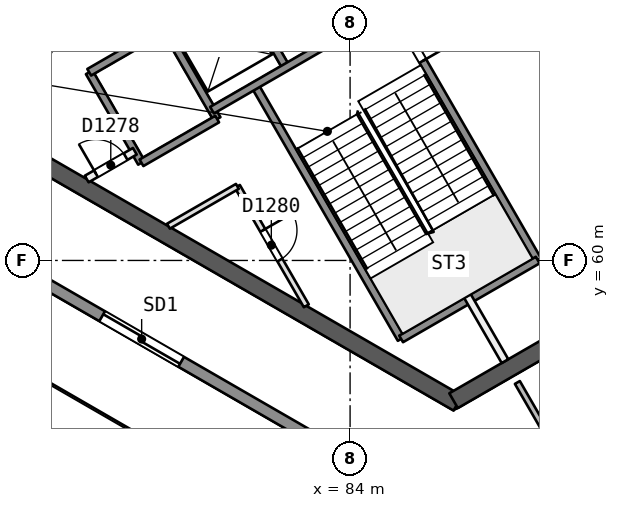
"""IFC4 building model, lengths in metres.
Left out: names, types, materials, properties, quantities, classifications, styles, units other than length and angle.
Written with IfcOpenShell. Run it as: python <this file> out.ifc"""

import sys

from ifc_helpers import new_model, si_unit, direction, frame, frame_2d, origin, place, context, subcontext, project, spatial, rectangle, extrude, element, fill, save


model = new_model("IFC4")
c1 = context("Model", 3, precision=1e-05, world=origin(), true_north=direction((0.0, 1.0)))
c2 = subcontext(c1, "Body", "Model", "MODEL_VIEW")
j1 = project(units=[si_unit("LENGTHUNIT", "METRE"), si_unit("PLANEANGLEUNIT", "RADIAN")], contexts=[c1])
p1 = place(None, origin())
s1 = spatial("IfcSite", under=j1, at=p1, CompositionType="ELEMENT")
p2 = place(p1, origin())
s2 = spatial("IfcBuilding", under=s1, at=p2, CompositionType="ELEMENT")
p3 = place(p2, frame((0.0, 0.0, 235.4)))
s3 = spatial("IfcBuildingStorey", under=s2, at=p3, CompositionType="ELEMENT", Elevation=235.4)
p4 = place(p3, frame((79.63, 71.981, 0.0), z_axis=(0.0, 0.0, 1.0), x_axis=(-0.500002171595, -0.86602415001, 0.0)))
e1 = element("IfcWall", 1, at=p4, inside=s3, PredefinedType="SHEAR", context=c2, shape_type="SweptSolid", body=[
    extrude(rectangle(XDim=10.25, YDim=0.45, at=frame_2d((5.125, 0.0))), origin(), (0.0, 0.0, 1.0), 3.7),
])
p5 = place(p4, frame((0.82, 0.0, 0.0)))
e2 = element("IfcOpeningElement", 2, at=p5, cuts=e1, PredefinedType="OPENING", context=c2, shape_type="SweptSolid", body=[
    extrude(rectangle(XDim=1.2, YDim=2.1, at=frame_2d((0.6, 1.05))), frame((0.0, 0.235, 0.0), z_axis=(0.0, -1.0, 0.0), x_axis=(1.0, 0.0, 0.0)), (0.0, 0.0, 1.0), 0.471),
])
p6 = place(p3, frame((74.617, 63.299, 0.0), z_axis=(0.0, 0.0, 1.0), x_axis=(0.86602594008, -0.499999071108, 0.0)))
e3 = element("IfcWall", 3, at=p6, inside=s3, PredefinedType="SHEAR", context=c2, shape_type="SweptSolid", body=[
    extrude(rectangle(XDim=14.108, YDim=0.45, at=frame_2d((7.054, 0.0))), origin(), (0.0, 0.0, 1.0), 3.7),
])
p7 = place(p3, frame((86.723, 56.31, 0.0), z_axis=(0.0, 0.0, 1.0), x_axis=(0.866042179588, 0.49997094233, 0.0)))
e4 = element("IfcWall", 4, at=p7, inside=s3, PredefinedType="SHEAR", context=c2, shape_type="SweptSolid", body=[
    extrude(rectangle(XDim=3.515, YDim=0.45, at=frame_2d((1.758, 0.0))), origin(), (0.0, 0.0, 1.0), 3.7),
])
p8 = place(p3, frame((88.402, 56.789, 0.0), z_axis=(0.0, 0.0, 1.0), x_axis=(0.500005547131, -0.866022201123, 0.0)))
e5 = element("IfcWall", 5, at=p8, inside=s3, PredefinedType="PARTITIONING", context=c2, shape_type="SweptSolid", body=[
    extrude(rectangle(XDim=3.334, YDim=0.15, at=frame_2d((1.667, 0.0))), origin(), (0.0, 0.0, 1.0), 3.3),
])
p9 = place(p3, frame((87.932, 52.496, 0.0), z_axis=(0.0, 0.0, 1.0), x_axis=(-0.866025334516, 0.500000119977, 0.0)))
e6 = element("IfcWall", 6, at=p9, inside=s3, PredefinedType="SOLIDWALL", context=c2, shape_type="SweptSolid", body=[
    extrude(rectangle(XDim=49.903, YDim=0.3, at=frame_2d((24.952, 0.0))), origin(), (0.0, 0.0, 1.0), 3.3),
])
p10 = place(p9, frame((23.907, 0.0, 0.0)))
e7 = element("IfcOpeningElement", 7, at=p10, cuts=e6, PredefinedType="OPENING", context=c2, shape_type="SweptSolid", body=[
    extrude(rectangle(XDim=2.4, YDim=2.4, at=frame_2d((1.2, 1.2))), frame((0.0, 0.161, 0.0), z_axis=(0.0, -1.0, 0.0), x_axis=(1.0, 0.0, 0.0)), (0.0, 0.0, 1.0), 0.321),
])
p11 = place(p9, frame((37.985, 0.0, 0.0)))
e8 = element("IfcOpeningElement", 8, at=p11, cuts=e6, PredefinedType="OPENING", context=c2, shape_type="SweptSolid", body=[
    extrude(rectangle(XDim=2.4, YDim=2.4, at=frame_2d((1.2, 1.2))), frame((0.0, 0.161, 0.0), z_axis=(0.0, -1.0, 0.0), x_axis=(1.0, 0.0, 0.0)), (0.0, 0.0, 1.0), 0.321),
])
p12 = place(p9, frame((9.674, 0.0, 0.0)))
e9 = element("IfcOpeningElement", 9, at=p12, cuts=e6, PredefinedType="OPENING", context=c2, shape_type="SweptSolid", body=[
    extrude(rectangle(XDim=2.4, YDim=2.4, at=frame_2d((1.2, 1.2))), frame((0.0, 0.161, 0.0), z_axis=(0.0, -1.0, 0.0), x_axis=(1.0, 0.0, 0.0)), (0.0, 0.0, 1.0), 0.321),
])
p13 = place(p3, frame((77.135, 64.952, 0.0), z_axis=(0.0, 0.0, 1.0), x_axis=(0.499996545922, -0.866027397988, 0.0)))
e10 = element("IfcWall", 10, at=p13, inside=s3, PredefinedType="SOLIDWALL", context=c2, shape_type="SweptSolid", body=[
    extrude(rectangle(XDim=2.75, YDim=0.2, at=frame_2d((1.375, 0.0))), origin(), (0.0, 0.0, 1.0), 3.3),
])
p14 = place(p3, frame((81.034, 61.949, 0.0), z_axis=(0.0, 0.0, 1.0), x_axis=(0.499945732631, -0.866056732798, 0.0)))
e11 = element("IfcWall", 11, at=p14, inside=s3, PredefinedType="PARTITIONING", context=c2, shape_type="SweptSolid", body=[
    extrude(rectangle(XDim=3.628, YDim=0.15, at=frame_2d((1.814, 0.0))), origin(), (0.0, 0.0, 1.0), 3.3),
])
p15 = place(p14, frame((1.337, 0.0, 0.0)))
e12 = element("IfcOpeningElement", 12, at=p15, cuts=e11, PredefinedType="OPENING", context=c2, shape_type="SweptSolid", body=[
    extrude(rectangle(XDim=0.9, YDim=2.1, at=frame_2d((0.45, 1.05))), frame((0.0, 0.085, 0.0), z_axis=(0.0, -1.0, 0.0), x_axis=(1.0, 0.0, 0.0)), (0.0, 0.0, 1.0), 0.171),
])
p16 = place(p3, frame((79.127, 66.102, 0.0), z_axis=(0.0, 0.0, 1.0), x_axis=(0.499996545922, -0.866027397988, 0.0)))
e13 = element("IfcWall", 13, at=p16, inside=s3, PredefinedType="SOLIDWALL", context=c2, shape_type="SweptSolid", body=[
    extrude(rectangle(XDim=2.75, YDim=0.2, at=frame_2d((1.375, 0.0))), origin(), (0.0, 0.0, 1.0), 3.3),
])
p17 = place(p3, frame((81.493, 64.604, 0.0), z_axis=(0.0, 0.0, 1.0), x_axis=(0.500006057782, -0.866021906294, 0.0)))
e14 = element("IfcWall", 14, at=p17, inside=s3, PredefinedType="SOLIDWALL", context=c2, shape_type="SweptSolid", body=[
    extrude(rectangle(XDim=7.7, YDim=0.2, at=frame_2d((3.85, 0.0))), origin(), (0.0, 0.0, 1.0), 3.3),
])
p18 = place(p3, frame((81.076, 67.227, 0.0), z_axis=(0.0, 0.0, 1.0), x_axis=(0.50000366821, -0.866023285932, 0.0)))
e15 = element("IfcWall", 15, at=p18, inside=s3, PredefinedType="SOLIDWALL", context=c2, shape_type="SweptSolid", body=[
    extrude(rectangle(XDim=2.48, YDim=0.2, at=frame_2d((1.24, 0.0))), origin(), (0.0, 0.0, 1.0), 3.3),
])
p19 = place(p3, frame((87.09, 59.06, 0.0), z_axis=(0.0, 0.0, 1.0), x_axis=(0.500011643316, -0.866018681408, 0.0)))
e16 = element("IfcWall", 16, at=p19, inside=s3, PredefinedType="PARTITIONING", context=c2, shape_type="SweptSolid", body=[
    extrude(rectangle(XDim=1.973, YDim=0.2, at=frame_2d((0.987, 0.0))), origin(), (0.0, 0.0, 1.0), 3.3),
])
p20 = place(p3, frame((85.087, 66.679, 0.0), z_axis=(0.0, 0.0, 1.0), x_axis=(0.500019787375, -0.866013979237, 0.0)))
e17 = element("IfcWall", 17, at=p20, inside=s3, PredefinedType="SOLIDWALL", context=c2, shape_type="SweptSolid", body=[
    extrude(rectangle(XDim=7.7, YDim=0.2, at=frame_2d((3.85, 0.0))), origin(), (0.0, 0.0, 1.0), 3.3),
])
p21 = place(p20, frame((0.55, 0.0, 0.0)))
e18 = element("IfcOpeningElement", 18, at=p21, cuts=e17, PredefinedType="OPENING", context=c2, shape_type="SweptSolid", body=[
    extrude(rectangle(XDim=1.1, YDim=2.1, at=frame_2d((0.55, 1.05))), frame((0.0, 0.11, 0.0), z_axis=(0.0, -1.0, 0.0), x_axis=(1.0, 0.0, 0.0)), (0.0, 0.0, 1.0), 0.221),
])
p22 = place(p3, frame((77.135, 64.952, 0.0), z_axis=(0.0, 0.0, 1.0), x_axis=(0.866031916153, 0.499988720078, 0.0)))
e19 = element("IfcWall", 19, at=p22, inside=s3, PredefinedType="SOLIDWALL", context=c2, shape_type="SweptSolid", body=[
    extrude(rectangle(XDim=11.35, YDim=0.2, at=frame_2d((5.675, 0.0))), origin(), (0.0, 0.0, 1.0), 3.3),
])
p23 = place(p22, frame((2.875, 0.0, 0.0)))
e20 = element("IfcOpeningElement", 20, at=p23, cuts=e19, PredefinedType="OPENING", context=c2, shape_type="SweptSolid", body=[
    extrude(rectangle(XDim=1.1, YDim=2.1, at=frame_2d((0.55, 1.05))), frame((0.0, 0.11, 0.0), z_axis=(0.0, -1.0, 0.0), x_axis=(1.0, 0.0, 0.0)), (0.0, 0.0, 1.0), 0.221),
])
p24 = place(p22, frame((5.125, 0.0, 0.0)))
e21 = element("IfcOpeningElement", 21, at=p24, cuts=e19, PredefinedType="OPENING", context=c2, shape_type="SweptSolid", body=[
    extrude(rectangle(XDim=1.1, YDim=2.1, at=frame_2d((0.55, 1.05))), frame((0.0, 0.11, 0.0), z_axis=(0.0, -1.0, 0.0), x_axis=(1.0, 0.0, 0.0)), (0.0, 0.0, 1.0), 0.221),
])
p25 = place(p22, frame((7.375, 0.0, 0.0)))
e22 = element("IfcOpeningElement", 22, at=p25, cuts=e19, PredefinedType="OPENING", context=c2, shape_type="SweptSolid", body=[
    extrude(rectangle(XDim=1.1, YDim=2.1, at=frame_2d((0.55, 1.05))), frame((0.0, 0.11, 0.0), z_axis=(0.0, -1.0, 0.0), x_axis=(1.0, 0.0, 0.0)), (0.0, 0.0, 1.0), 0.221),
])
p26 = place(p3, frame((77.07, 62.143, 0.0), z_axis=(0.0, 0.0, 1.0), x_axis=(0.866013036001, 0.500021421018, 0.0)))
e23 = element("IfcWall", 23, at=p26, inside=s3, PredefinedType="PARTITIONING", context=c2, shape_type="SweptSolid", body=[
    extrude(rectangle(XDim=1.461, YDim=0.2, at=frame_2d((0.73, 0.0))), origin(), (0.0, 0.0, 1.0), 3.3),
])
p27 = place(p26, frame((0.281, 0.0, 0.0)))
e24 = element("IfcOpeningElement", 24, at=p27, cuts=e23, PredefinedType="OPENING", context=c2, shape_type="SweptSolid", body=[
    extrude(rectangle(XDim=0.9, YDim=2.1, at=frame_2d((0.45, 1.05))), frame((0.0, 0.11, 0.0), z_axis=(0.0, -1.0, 0.0), x_axis=(1.0, 0.0, 0.0)), (0.0, 0.0, 1.0), 0.221),
])
p28 = place(p3, frame((80.367, 63.954, 0.0), z_axis=(0.0, 0.0, 1.0), x_axis=(0.866026575979, 0.499997969693, 0.0)))
e25 = element("IfcWall", 25, at=p28, inside=s3, PredefinedType="SOLIDWALL", context=c2, shape_type="SweptSolid", body=[
    extrude(rectangle(XDim=6.75, YDim=0.2, at=frame_2d((3.375, 0.0))), origin(), (0.0, 0.0, 1.0), 3.3),
])
p29 = place(p3, frame((78.51, 62.57, 0.0), z_axis=(0.0, 0.0, 1.0), x_axis=(0.866053019151, 0.499952165731, 0.0)))
e26 = element("IfcWall", 26, at=p29, inside=s3, PredefinedType="SOLIDWALL", context=c2, shape_type="SweptSolid", body=[
    extrude(rectangle(XDim=2.3, YDim=0.2, at=frame_2d((1.15, 0.0))), origin(), (0.0, 0.0, 1.0), 3.3),
])
p30 = place(p3, frame((79.22, 60.901, 0.0), z_axis=(0.0, 0.0, 1.0), x_axis=(0.866040030748, 0.499974664501, 0.0)))
e27 = element("IfcWall", 27, at=p30, inside=s3, PredefinedType="PARTITIONING", context=c2, shape_type="SweptSolid", body=[
    extrude(rectangle(XDim=2.095, YDim=0.15, at=frame_2d((1.047, 0.0))), origin(), (0.0, 0.0, 1.0), 3.3),
])
p31 = place(p3, frame((85.343, 57.935, 0.0), z_axis=(0.0, 0.0, 1.0), x_axis=(0.866004344652, 0.500036473714, 0.0)))
e28 = element("IfcWall", 28, at=p31, inside=s3, PredefinedType="SOLIDWALL", context=c2, shape_type="SweptSolid", body=[
    extrude(rectangle(XDim=4.15, YDim=0.2, at=frame_2d((2.075, 0.0))), origin(), (0.0, 0.0, 1.0), 3.3),
])
p32 = place(p12, origin())
e29 = element("IfcDoor", 29, at=p32, inside=s3, OperationType="SLIDING_TO_LEFT", PredefinedType="NOTDEFINED", context=c2, shape_type="SweptSolid", body=[
    extrude(rectangle(XDim=2.4, YDim=2.4, at=frame_2d((1.2, 1.2))), frame((0.0, 0.025, 0.0), z_axis=(0.0, -1.0, 0.0), x_axis=(1.0, 0.0, 0.0)), (0.0, 0.0, 1.0), 0.05),
])
fill(e9, e29)
p33 = place(p27, origin())
e30 = element("IfcDoor", 30, at=p33, inside=s3, OperationType="SINGLE_SWING_LEFT", PredefinedType="NOTDEFINED", context=c2, shape_type="SweptSolid", body=[
    extrude(rectangle(XDim=0.9, YDim=2.1, at=frame_2d((0.45, 1.05))), frame((0.0, 0.025, 0.0), z_axis=(0.0, -1.0, 0.0), x_axis=(1.0, 0.0, 0.0)), (0.0, 0.0, 1.0), 0.05),
])
fill(e24, e30)
p34 = place(p21, origin())
e31 = element("IfcDoor", 31, at=p34, inside=s3, OperationType="SINGLE_SWING_RIGHT", PredefinedType="NOTDEFINED", context=c2, shape_type="SweptSolid", body=[
    extrude(rectangle(XDim=1.1, YDim=2.1, at=frame_2d((0.55, 1.05))), frame((0.0, 0.025, 0.0), z_axis=(0.0, -1.0, 0.0), x_axis=(1.0, 0.0, 0.0)), (0.0, 0.0, 1.0), 0.05),
])
fill(e18, e31)
p35 = place(p15, origin())
e32 = element("IfcDoor", 32, at=p35, inside=s3, OperationType="SINGLE_SWING_LEFT", PredefinedType="NOTDEFINED", context=c2, shape_type="SweptSolid", body=[
    extrude(rectangle(XDim=0.9, YDim=2.1, at=frame_2d((0.45, 1.05))), frame((0.0, 0.025, 0.0), z_axis=(0.0, -1.0, 0.0), x_axis=(1.0, 0.0, 0.0)), (0.0, 0.0, 1.0), 0.05),
])
fill(e12, e32)
save(model, sys.argv[1])
